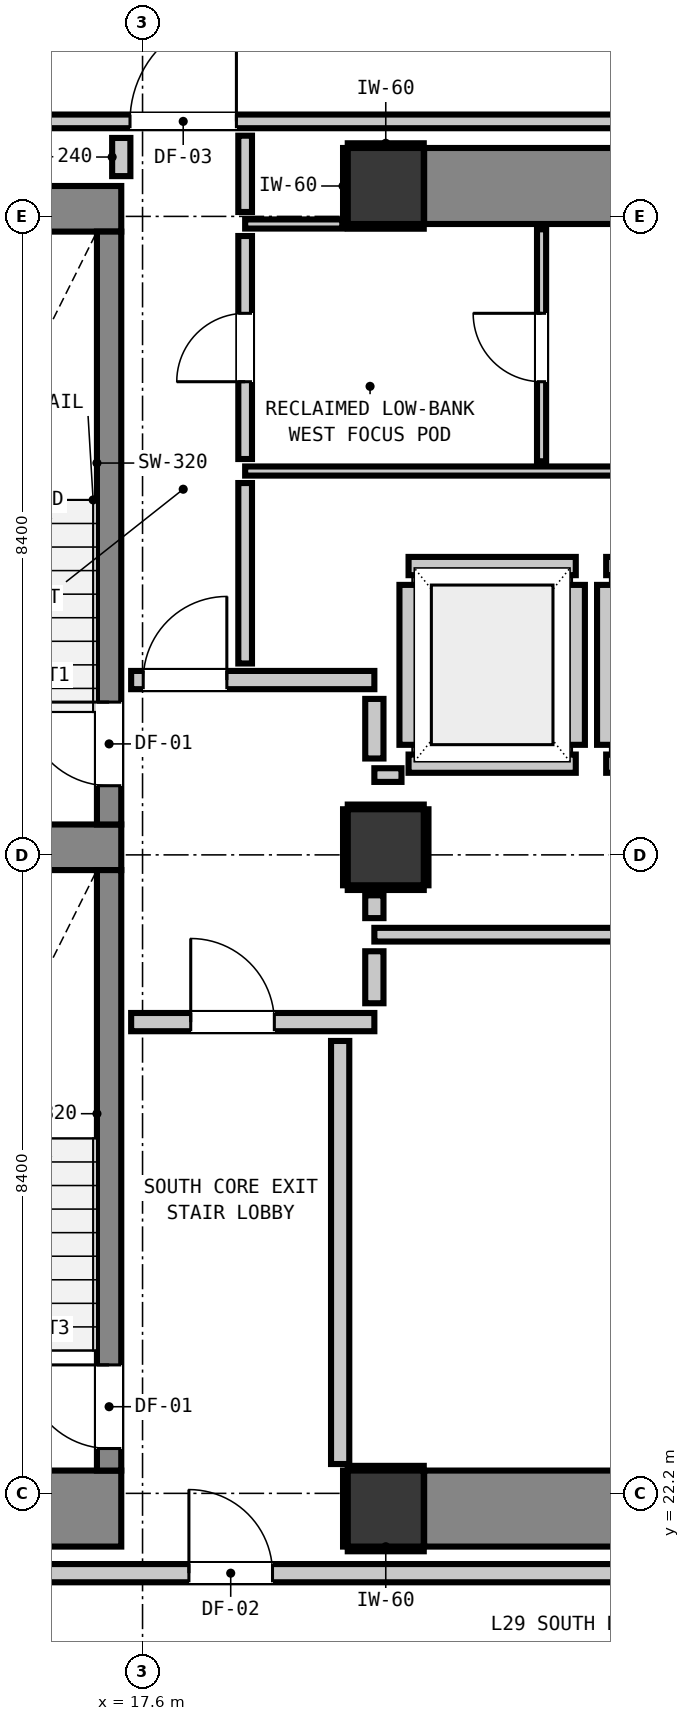
"""IFC4 building model, lengths in metres.
Left out: names, types, materials, properties, quantities, classifications, styles, units other than length and angle.
Written with IfcOpenShell. Run it as: python <this file> out.ifc"""

import sys

from ifc_helpers import new_model, si_unit, direction, frame, frame_2d, origin, origin_2d, place, context, subcontext, project, spatial, rectangle, extrude, element, fill, save


model = new_model("IFC4")
c1 = context("Model", 3, precision=1e-05, world=origin(), true_north=direction((0.0, 1.0)))
c2 = subcontext(c1, "Body", "Model", "MODEL_VIEW")
j1 = project(units=[si_unit("LENGTHUNIT", "METRE"), si_unit("PLANEANGLEUNIT", "RADIAN")], contexts=[c1])
p1 = place(None, origin())
s1 = spatial("IfcSite", under=j1, at=p1, CompositionType="ELEMENT")
p2 = place(p1, origin())
s2 = spatial("IfcBuilding", under=s1, at=p2, CompositionType="ELEMENT")
p3 = place(p2, frame((0.0, 0.0, 102.76)))
s3 = spatial("IfcBuildingStorey", under=s2, at=p3, CompositionType="ELEMENT", Elevation=102.76)
for number, where, z_axis, x_axis in (
    (1, (20.8, 22.0, 0.0), (0.0, 0.0, 1.0), (1.0, 0.0, 0.0)),
    (2, (20.8, 39.4, 0.0), (0.0, 0.0, 1.0), (1.0, 0.0, 0.0)),
):
    element("IfcColumn", number, at=place(p3, frame(where, z_axis=z_axis, x_axis=x_axis)), inside=s3, PredefinedType="COLUMN", context=c2, shape_type="SweptSolid", body=[
        extrude(rectangle(XDim=1.0, YDim=1.0, at=origin_2d()), origin(), (0.0, 0.0, 1.0), 3.32),
    ])
p4 = place(p3, frame((13.24, 22.0, 0.0), z_axis=(0.0, 0.0, 1.0), x_axis=(1.0, 0.0, 0.0)))
e3 = element("IfcWall", 3, at=p4, inside=s3, PredefinedType="SHEAR", context=c2, shape_type="SweptSolid", body=[
    extrude(rectangle(XDim=4.08, YDim=1.0, at=frame_2d((2.04, 0.0))), origin(), (0.0, 0.0, 1.0), 3.32),
])
p5 = place(p3, frame((13.24, 39.1, 0.0), z_axis=(0.0, 0.0, 1.0), x_axis=(1.0, 0.0, 0.0)))
e4 = element("IfcWall", 4, at=p5, inside=s3, PredefinedType="SHEAR", context=c2, shape_type="SweptSolid", body=[
    extrude(rectangle(XDim=4.08, YDim=0.6, at=frame_2d((2.04, 0.0))), origin(), (0.0, 0.0, 1.0), 3.32),
])
p6 = place(p3, frame((13.905, 30.7, 0.0), z_axis=(0.0, 0.0, 1.0), x_axis=(1.0, 0.0, 0.0)))
e5 = element("IfcWall", 5, at=p6, inside=s3, PredefinedType="SHEAR", context=c2, shape_type="SweptSolid", body=[
    extrude(rectangle(XDim=3.415, YDim=0.6, at=frame_2d((1.708, 0.0))), origin(), (0.0, 0.0, 1.0), 3.32),
])
for number, where, z_axis, x_axis in (
    (6, (21.305, 22.0, 0.0), (0.0, 0.0, 1.0), (1.0, 0.0, 0.0)),
    (7, (21.305, 39.4, 0.0), (0.0, 0.0, 1.0), (1.0, 0.0, 0.0)),
):
    element("IfcWall", number, at=place(p3, frame(where, z_axis=z_axis, x_axis=x_axis)), inside=s3, PredefinedType="SHEAR", context=c2, shape_type="SweptSolid", body=[
        extrude(rectangle(XDim=7.39, YDim=1.0, at=frame_2d((3.695, 0.0))), origin(), (0.0, 0.0, 1.0), 3.32),
    ])
p7 = place(p3, frame((17.16, 31.0, 0.0), z_axis=(0.0, 0.0, 1.0), x_axis=(0.0, 1.0, 0.0)))
e8 = element("IfcWall", 8, at=p7, inside=s3, PredefinedType="SHEAR", context=c2, shape_type="SweptSolid", body=[
    extrude(rectangle(XDim=7.8, YDim=0.32, at=frame_2d((3.9, 0.0))), origin(), (0.0, 0.0, 1.0), 3.32),
])
p8 = place(p7, frame((0.51, 0.0, 0.0)))
e9 = element("IfcOpeningElement", 9, at=p8, cuts=e8, PredefinedType="OPENING", context=c2, shape_type="SweptSolid", body=[
    extrude(rectangle(XDim=1.1, YDim=2.15, at=frame_2d((0.55, 1.075))), frame((0.0, 0.17, 0.0), z_axis=(0.0, -1.0, 0.0), x_axis=(1.0, 0.0, 0.0)), (0.0, 0.0, 1.0), 0.34),
])
p9 = place(p3, frame((17.16, 22.5, 0.0), z_axis=(0.0, 0.0, 1.0), x_axis=(0.0, 1.0, 0.0)))
e10 = element("IfcWall", 10, at=p9, inside=s3, PredefinedType="SHEAR", context=c2, shape_type="SweptSolid", body=[
    extrude(rectangle(XDim=7.9, YDim=0.32, at=frame_2d((3.95, 0.0))), origin(), (0.0, 0.0, 1.0), 3.32),
])
p10 = place(p9, frame((0.29, 0.0, 0.0)))
e11 = element("IfcOpeningElement", 11, at=p10, cuts=e10, PredefinedType="OPENING", context=c2, shape_type="SweptSolid", body=[
    extrude(rectangle(XDim=1.1, YDim=2.15, at=frame_2d((0.55, 1.075))), frame((0.0, 0.17, 0.0), z_axis=(0.0, -1.0, 0.0), x_axis=(1.0, 0.0, 0.0)), (0.0, 0.0, 1.0), 0.34),
])
p11 = place(p3, frame((20.8, 30.7, 0.0), z_axis=(0.0, 0.0, 1.0), x_axis=(1.0, 0.0, 0.0)))
e12 = element("IfcColumn", 12, at=p11, inside=s3, PredefinedType="COLUMN", context=c2, shape_type="SweptSolid", body=[
    extrude(rectangle(XDim=1.0, YDim=1.0, at=origin_2d()), origin(), (0.0, 0.0, 1.0), 3.32),
])
for number, where, z_axis, x_axis in (
    (13, (21.1, 31.8, 0.0), (0.0, 0.0, 1.0), (1.0, 0.0, 0.0)),
    (14, (21.1, 34.4, 0.0), (0.0, 0.0, 1.0), (1.0, 0.0, 0.0)),
):
    element("IfcWall", number, at=place(p3, frame(where, z_axis=z_axis, x_axis=x_axis)), inside=s3, PredefinedType="PARTITIONING", context=c2, shape_type="SweptSolid", body=[
        extrude(rectangle(XDim=2.2, YDim=0.24, at=frame_2d((1.1, 0.0))), origin(), (0.0, 0.0, 1.0), 2.9),
    ])
p12 = place(p3, frame((21.1, 32.048, 0.0), z_axis=(0.0, 0.0, 1.0), x_axis=(0.0, 1.0, 0.0)))
e15 = element("IfcWall", 15, at=p12, inside=s3, PredefinedType="PARTITIONING", context=c2, shape_type="SweptSolid", body=[
    extrude(rectangle(XDim=2.104, YDim=0.24, at=frame_2d((1.052, 0.0))), origin(), (0.0, 0.0, 1.0), 0.905),
])
p13 = place(p3, frame((23.3, 32.048, 0.0), z_axis=(0.0, 0.0, 1.0), x_axis=(0.0, 1.0, 0.0)))
e16 = element("IfcWall", 16, at=p13, inside=s3, PredefinedType="PARTITIONING", context=c2, shape_type="SweptSolid", body=[
    extrude(rectangle(XDim=2.104, YDim=0.24, at=frame_2d((1.052, 0.0))), origin(), (0.0, 0.0, 1.0), 2.9),
])
for number, where, z_axis, x_axis in (
    (17, (23.7, 31.8, 0.0), (0.0, 0.0, 1.0), (1.0, 0.0, 0.0)),
    (18, (23.7, 34.4, 0.0), (0.0, 0.0, 1.0), (1.0, 0.0, 0.0)),
):
    element("IfcWall", number, at=place(p3, frame(where, z_axis=z_axis, x_axis=x_axis)), inside=s3, PredefinedType="PARTITIONING", context=c2, shape_type="SweptSolid", body=[
        extrude(rectangle(XDim=2.2, YDim=0.24, at=frame_2d((1.1, 0.0))), origin(), (0.0, 0.0, 1.0), 2.9),
    ])
p14 = place(p3, frame((23.7, 32.048, 0.0), z_axis=(0.0, 0.0, 1.0), x_axis=(0.0, 1.0, 0.0)))
e19 = element("IfcWall", 19, at=p14, inside=s3, PredefinedType="PARTITIONING", context=c2, shape_type="SweptSolid", body=[
    extrude(rectangle(XDim=2.104, YDim=0.24, at=frame_2d((1.052, 0.0))), origin(), (0.0, 0.0, 1.0), 2.9),
])
p15 = place(p3, frame((1.827, 21.15, 0.0), z_axis=(0.0, 0.0, 1.0), x_axis=(1.0, 0.0, 0.0)))
e20 = element("IfcWall", 20, at=p15, inside=s3, PredefinedType="PARTITIONING", context=c2, shape_type="SweptSolid", body=[
    extrude(rectangle(XDim=42.146, YDim=0.24, at=frame_2d((21.073, 0.0))), origin(), (0.0, 0.0, 1.0), 2.9),
])
p16 = place(p15, frame((16.383, 0.0, 0.0)))
e21 = element("IfcOpeningElement", 21, at=p16, cuts=e20, PredefinedType="OPENING", context=c2, shape_type="SweptSolid", body=[
    extrude(rectangle(XDim=1.1, YDim=2.15, at=frame_2d((0.55, 1.075))), frame((0.0, 0.13, 0.0), z_axis=(0.0, -1.0, 0.0), x_axis=(1.0, 0.0, 0.0)), (0.0, 0.0, 1.0), 0.26),
])
p17 = place(p15, frame((8.623, 0.0, 0.0)))
e22 = element("IfcOpeningElement", 22, at=p17, cuts=e20, PredefinedType="OPENING", context=c2, shape_type="SweptSolid", body=[
    extrude(rectangle(XDim=1.4, YDim=2.15, at=frame_2d((0.7, 1.075))), frame((0.0, 0.13, 0.0), z_axis=(0.0, -1.0, 0.0), x_axis=(1.0, 0.0, 0.0)), (0.0, 0.0, 1.0), 0.26),
])
p18 = place(p15, frame((36.223, 0.0, 0.0)))
e23 = element("IfcOpeningElement", 23, at=p18, cuts=e20, PredefinedType="OPENING", context=c2, shape_type="SweptSolid", body=[
    extrude(rectangle(XDim=1.4, YDim=2.15, at=frame_2d((0.7, 1.075))), frame((0.0, 0.13, 0.0), z_axis=(0.0, -1.0, 0.0), x_axis=(1.0, 0.0, 0.0)), (0.0, 0.0, 1.0), 0.26),
])
p19 = place(p3, frame((17.45, 28.4, 0.0), z_axis=(0.0, 0.0, 1.0), x_axis=(1.0, 0.0, 0.0)))
e24 = element("IfcWall", 24, at=p19, inside=s3, PredefinedType="PARTITIONING", context=c2, shape_type="SweptSolid", body=[
    extrude(rectangle(XDim=3.2, YDim=0.24, at=frame_2d((1.6, 0.0))), origin(), (0.0, 0.0, 1.0), 2.9),
])
p20 = place(p19, frame((0.784, 0.0, 0.0)))
e25 = element("IfcOpeningElement", 25, at=p20, cuts=e24, PredefinedType="OPENING", context=c2, shape_type="SweptSolid", body=[
    extrude(rectangle(XDim=1.1, YDim=2.15, at=frame_2d((0.55, 1.075))), frame((0.0, 0.13, 0.0), z_axis=(0.0, -1.0, 0.0), x_axis=(1.0, 0.0, 0.0)), (0.0, 0.0, 1.0), 0.26),
])
p21 = place(p3, frame((17.45, 32.9, 0.0), z_axis=(0.0, 0.0, 1.0), x_axis=(1.0, 0.0, 0.0)))
e26 = element("IfcWall", 26, at=p21, inside=s3, PredefinedType="PARTITIONING", context=c2, shape_type="SweptSolid", body=[
    extrude(rectangle(XDim=3.2, YDim=0.24, at=frame_2d((1.6, 0.0))), origin(), (0.0, 0.0, 1.0), 2.9),
])
p22 = place(p21, frame((0.159, 0.0, 0.0)))
e27 = element("IfcOpeningElement", 27, at=p22, cuts=e26, PredefinedType="OPENING", context=c2, shape_type="SweptSolid", body=[
    extrude(rectangle(XDim=1.1, YDim=2.15, at=frame_2d((0.55, 1.075))), frame((0.0, 0.13, 0.0), z_axis=(0.0, -1.0, 0.0), x_axis=(1.0, 0.0, 0.0)), (0.0, 0.0, 1.0), 0.26),
])
p23 = place(p3, frame((20.65, 29.55, 0.0), z_axis=(0.0, 0.0, 1.0), x_axis=(1.0, 0.0, 0.0)))
e28 = element("IfcWall", 28, at=p23, inside=s3, PredefinedType="PARTITIONING", context=c2, shape_type="SweptSolid", body=[
    extrude(rectangle(XDim=9.325, YDim=0.18, at=frame_2d((4.663, 0.0))), origin(), (0.0, 0.0, 1.0), 2.9),
])
p24 = place(p3, frame((20.65, 31.65, 0.0), z_axis=(0.0, 0.0, 1.0), x_axis=(1.0, 0.0, 0.0)))
e29 = element("IfcWall", 29, at=p24, inside=s3, PredefinedType="PARTITIONING", context=c2, shape_type="SweptSolid", body=[
    extrude(rectangle(XDim=0.357, YDim=0.18, at=frame_2d((0.179, 0.0))), origin(), (0.0, 0.0, 1.0), 2.9),
])
p25 = place(p3, frame((1.827, 40.25, 0.0), z_axis=(0.0, 0.0, 1.0), x_axis=(1.0, 0.0, 0.0)))
e30 = element("IfcWall", 30, at=p25, inside=s3, PredefinedType="PARTITIONING", context=c2, shape_type="SweptSolid", body=[
    extrude(rectangle(XDim=42.146, YDim=0.18, at=frame_2d((21.073, 0.0))), origin(), (0.0, 0.0, 1.0), 2.9),
])
p26 = place(p25, frame((15.608, 0.0, 0.0)))
e31 = element("IfcOpeningElement", 31, at=p26, cuts=e30, PredefinedType="OPENING", context=c2, shape_type="SweptSolid", body=[
    extrude(rectangle(XDim=1.4, YDim=2.15, at=frame_2d((0.7, 1.075))), frame((0.0, 0.1, 0.0), z_axis=(0.0, -1.0, 0.0), x_axis=(1.0, 0.0, 0.0)), (0.0, 0.0, 1.0), 0.2),
])
p27 = place(p25, frame((8.623, 0.0, 0.0)))
e32 = element("IfcOpeningElement", 32, at=p27, cuts=e30, PredefinedType="OPENING", context=c2, shape_type="SweptSolid", body=[
    extrude(rectangle(XDim=1.4, YDim=2.15, at=frame_2d((0.7, 1.075))), frame((0.0, 0.1, 0.0), z_axis=(0.0, -1.0, 0.0), x_axis=(1.0, 0.0, 0.0)), (0.0, 0.0, 1.0), 0.2),
])
p28 = place(p25, frame((36.223, 0.0, 0.0)))
e33 = element("IfcOpeningElement", 33, at=p28, cuts=e30, PredefinedType="OPENING", context=c2, shape_type="SweptSolid", body=[
    extrude(rectangle(XDim=1.4, YDim=2.15, at=frame_2d((0.7, 1.075))), frame((0.0, 0.1, 0.0), z_axis=(0.0, -1.0, 0.0), x_axis=(1.0, 0.0, 0.0)), (0.0, 0.0, 1.0), 0.2),
])
p29 = place(p25, frame((3.697, 0.0, 0.0)))
e34 = element("IfcOpeningElement", 34, at=p29, cuts=e30, PredefinedType="OPENING", context=c2, shape_type="SweptSolid", body=[
    extrude(rectangle(XDim=0.95, YDim=2.1, at=frame_2d((0.475, 1.05))), frame((0.0, 0.1, 0.0), z_axis=(0.0, -1.0, 0.0), x_axis=(1.0, 0.0, 0.0)), (0.0, 0.0, 1.0), 0.2),
])
p30 = place(p25, frame((39.574, 0.0, 0.0)))
e35 = element("IfcOpeningElement", 35, at=p30, cuts=e30, PredefinedType="OPENING", context=c2, shape_type="SweptSolid", body=[
    extrude(rectangle(XDim=0.9, YDim=2.1, at=frame_2d((0.45, 1.05))), frame((0.0, 0.1, 0.0), z_axis=(0.0, -1.0, 0.0), x_axis=(1.0, 0.0, 0.0)), (0.0, 0.0, 1.0), 0.2),
])
p31 = place(p3, frame((18.95, 35.65, 0.0), z_axis=(0.0, 0.0, 1.0), x_axis=(1.0, 0.0, 0.0)))
e36 = element("IfcWall", 36, at=p31, inside=s3, PredefinedType="PARTITIONING", context=c2, shape_type="SweptSolid", body=[
    extrude(rectangle(XDim=11.025, YDim=0.12, at=frame_2d((5.513, 0.0))), origin(), (0.0, 0.0, 1.0), 2.9),
])
p32 = place(p3, frame((18.95, 38.9, 0.0), z_axis=(0.0, 0.0, 1.0), x_axis=(1.0, 0.0, 0.0)))
e37 = element("IfcWall", 37, at=p32, inside=s3, PredefinedType="PARTITIONING", context=c2, shape_type="SweptSolid", body=[
    extrude(rectangle(XDim=1.278, YDim=0.12, at=frame_2d((0.639, 0.0))), origin(), (0.0, 0.0, 1.0), 0.905),
])
p33 = place(p3, frame((17.32, 39.53, 0.0), z_axis=(0.0, 0.0, 1.0), x_axis=(0.0, 1.0, 0.0)))
e38 = element("IfcWall", 38, at=p33, inside=s3, PredefinedType="PARTITIONING", context=c2, shape_type="SweptSolid", body=[
    extrude(rectangle(XDim=0.502, YDim=0.24, at=frame_2d((0.251, 0.0))), origin(), (0.0, 0.0, 1.0), 2.9),
])
p34 = place(p3, frame((20.2, 22.586, 0.0), z_axis=(0.0, 0.0, 1.0), x_axis=(0.0, 1.0, 0.0)))
e39 = element("IfcWall", 39, at=p34, inside=s3, PredefinedType="PARTITIONING", context=c2, shape_type="SweptSolid", body=[
    extrude(rectangle(XDim=5.566, YDim=0.24, at=frame_2d((2.783, 0.0))), origin(), (0.0, 0.0, 1.0), 0.905),
])
p35 = place(p3, frame((20.65, 28.648, 0.0), z_axis=(0.0, 0.0, 1.0), x_axis=(0.0, 1.0, 0.0)))
e40 = element("IfcWall", 40, at=p35, inside=s3, PredefinedType="PARTITIONING", context=c2, shape_type="SweptSolid", body=[
    extrude(rectangle(XDim=0.684, YDim=0.24, at=frame_2d((0.342, 0.0))), origin(), (0.0, 0.0, 1.0), 0.905),
])
p36 = place(p3, frame((20.65, 29.768, 0.0), z_axis=(0.0, 0.0, 1.0), x_axis=(0.0, 1.0, 0.0)))
e41 = element("IfcWall", 41, at=p36, inside=s3, PredefinedType="PARTITIONING", context=c2, shape_type="SweptSolid", body=[
    extrude(rectangle(XDim=0.3, YDim=0.24, at=frame_2d((0.15, 0.0))), origin(), (0.0, 0.0, 1.0), 0.905),
])
p37 = place(p3, frame((20.65, 31.868, 0.0), z_axis=(0.0, 0.0, 1.0), x_axis=(0.0, 1.0, 0.0)))
e42 = element("IfcWall", 42, at=p37, inside=s3, PredefinedType="PARTITIONING", context=c2, shape_type="SweptSolid", body=[
    extrude(rectangle(XDim=0.784, YDim=0.24, at=frame_2d((0.392, 0.0))), origin(), (0.0, 0.0, 1.0), 0.905),
])
p38 = place(p3, frame((18.95, 33.118, 0.0), z_axis=(0.0, 0.0, 1.0), x_axis=(0.0, 1.0, 0.0)))
e43 = element("IfcWall", 43, at=p38, inside=s3, PredefinedType="PARTITIONING", context=c2, shape_type="SweptSolid", body=[
    extrude(rectangle(XDim=2.374, YDim=0.18, at=frame_2d((1.187, 0.0))), origin(), (0.0, 0.0, 1.0), 2.9),
])
p39 = place(p3, frame((18.95, 35.808, 0.0), z_axis=(0.0, 0.0, 1.0), x_axis=(0.0, 1.0, 0.0)))
e44 = element("IfcWall", 44, at=p39, inside=s3, PredefinedType="PARTITIONING", context=c2, shape_type="SweptSolid", body=[
    extrude(rectangle(XDim=2.934, YDim=0.18, at=frame_2d((1.467, 0.0))), origin(), (0.0, 0.0, 1.0), 2.9),
])
p40 = place(p39, frame((1.017, 0.0, 0.0)))
e45 = element("IfcOpeningElement", 45, at=p40, cuts=e44, PredefinedType="OPENING", context=c2, shape_type="SweptSolid", body=[
    extrude(rectangle(XDim=0.9, YDim=2.1, at=frame_2d((0.45, 1.05))), frame((0.0, 0.1, 0.0), z_axis=(0.0, -1.0, 0.0), x_axis=(1.0, 0.0, 0.0)), (0.0, 0.0, 1.0), 0.2),
])
p41 = place(p3, frame((18.95, 39.058, 0.0), z_axis=(0.0, 0.0, 1.0), x_axis=(0.0, 1.0, 0.0)))
e46 = element("IfcWall", 46, at=p41, inside=s3, PredefinedType="PARTITIONING", context=c2, shape_type="SweptSolid", body=[
    extrude(rectangle(XDim=1.004, YDim=0.18, at=frame_2d((0.502, 0.0))), origin(), (0.0, 0.0, 1.0), 2.9),
])
p42 = place(p3, frame((22.85, 35.778, 0.0), z_axis=(0.0, 0.0, 1.0), x_axis=(0.0, 1.0, 0.0)))
e47 = element("IfcWall", 47, at=p42, inside=s3, PredefinedType="PARTITIONING", context=c2, shape_type="SweptSolid", body=[
    extrude(rectangle(XDim=3.052, YDim=0.12, at=frame_2d((1.526, 0.0))), origin(), (0.0, 0.0, 1.0), 2.9),
])
p43 = place(p42, frame((1.047, 0.0, 0.0)))
e48 = element("IfcOpeningElement", 48, at=p43, cuts=e47, PredefinedType="OPENING", context=c2, shape_type="SweptSolid", body=[
    extrude(rectangle(XDim=0.9, YDim=2.1, at=frame_2d((0.45, 1.05))), frame((0.0, 0.07, 0.0), z_axis=(0.0, -1.0, 0.0), x_axis=(1.0, 0.0, 0.0)), (0.0, 0.0, 1.0), 0.14),
])
for number, where, z_axis, x_axis in (
    (49, (20.3, 21.468, 0.0), (0.0, 0.0, 1.0), (1.0, 0.0, 0.0)),
    (50, (20.3, 22.532, 0.0), (0.0, 0.0, 1.0), (1.0, 0.0, 0.0)),
    (51, (20.268, 21.5, 0.0), (0.0, 0.0, 1.0), (0.0, 1.0, 0.0)),
    (52, (20.3, 38.868, 0.0), (0.0, 0.0, 1.0), (1.0, 0.0, 0.0)),
    (53, (20.3, 39.932, 0.0), (0.0, 0.0, 1.0), (1.0, 0.0, 0.0)),
    (54, (20.268, 38.9, 0.0), (0.0, 0.0, 1.0), (0.0, 1.0, 0.0)),
    (55, (20.3, 30.168, 0.0), (0.0, 0.0, 1.0), (1.0, 0.0, 0.0)),
    (56, (20.3, 31.232, 0.0), (0.0, 0.0, 1.0), (1.0, 0.0, 0.0)),
    (57, (20.268, 30.2, 0.0), (0.0, 0.0, 1.0), (0.0, 1.0, 0.0)),
    (58, (21.332, 30.2, 0.0), (0.0, 0.0, 1.0), (0.0, 1.0, 0.0)),
):
    element("IfcWall", number, at=place(p3, frame(where, z_axis=z_axis, x_axis=x_axis)), inside=s3, PredefinedType="PARTITIONING", context=c2, shape_type="SweptSolid", body=[
        extrude(rectangle(XDim=1.0, YDim=0.06, at=frame_2d((0.5, 0.0))), origin(), (0.0, 0.0, 1.0), 0.905),
    ])
p44 = place(p8, origin())
e59 = element("IfcDoor", 59, at=p44, inside=s3, OperationType="SINGLE_SWING_RIGHT", PredefinedType="DOOR", context=c2, shape_type="SweptSolid", body=[
    extrude(rectangle(XDim=1.1, YDim=2.15, at=frame_2d((0.55, 1.075))), frame((0.0, 0.025, 0.0), z_axis=(0.0, -1.0, 0.0), x_axis=(1.0, 0.0, 0.0)), (0.0, 0.0, 1.0), 0.05),
])
fill(e9, e59)
p45 = place(p10, origin())
e60 = element("IfcDoor", 60, at=p45, inside=s3, OperationType="SINGLE_SWING_RIGHT", PredefinedType="DOOR", context=c2, shape_type="SweptSolid", body=[
    extrude(rectangle(XDim=1.1, YDim=2.15, at=frame_2d((0.55, 1.075))), frame((0.0, 0.025, 0.0), z_axis=(0.0, -1.0, 0.0), x_axis=(1.0, 0.0, 0.0)), (0.0, 0.0, 1.0), 0.05),
])
fill(e11, e60)
p46 = place(p20, origin())
e61 = element("IfcDoor", 61, at=p46, inside=s3, OperationType="SINGLE_SWING_LEFT", PredefinedType="DOOR", context=c2, shape_type="SweptSolid", body=[
    extrude(rectangle(XDim=1.1, YDim=2.15, at=frame_2d((0.55, 1.075))), frame((0.0, 0.025, 0.0), z_axis=(0.0, -1.0, 0.0), x_axis=(1.0, 0.0, 0.0)), (0.0, 0.0, 1.0), 0.05),
])
fill(e25, e61)
p47 = place(p22, origin())
e62 = element("IfcDoor", 62, at=p47, inside=s3, OperationType="SINGLE_SWING_RIGHT", PredefinedType="DOOR", context=c2, shape_type="SweptSolid", body=[
    extrude(rectangle(XDim=1.1, YDim=2.15, at=frame_2d((0.55, 1.075))), frame((0.0, 0.025, 0.0), z_axis=(0.0, -1.0, 0.0), x_axis=(1.0, 0.0, 0.0)), (0.0, 0.0, 1.0), 0.05),
])
fill(e27, e62)
p48 = place(p16, origin())
e63 = element("IfcDoor", 63, at=p48, inside=s3, OperationType="SINGLE_SWING_LEFT", PredefinedType="DOOR", context=c2, shape_type="SweptSolid", body=[
    extrude(rectangle(XDim=1.1, YDim=2.15, at=frame_2d((0.55, 1.075))), frame((0.0, 0.025, 0.0), z_axis=(0.0, -1.0, 0.0), x_axis=(1.0, 0.0, 0.0)), (0.0, 0.0, 1.0), 0.05),
])
fill(e21, e63)
p49 = place(p26, origin())
e64 = element("IfcDoor", 64, at=p49, inside=s3, OperationType="SINGLE_SWING_RIGHT", PredefinedType="DOOR", context=c2, shape_type="SweptSolid", body=[
    extrude(rectangle(XDim=1.4, YDim=2.15, at=frame_2d((0.7, 1.075))), frame((0.0, 0.025, 0.0), z_axis=(0.0, -1.0, 0.0), x_axis=(1.0, 0.0, 0.0)), (0.0, 0.0, 1.0), 0.05),
])
fill(e31, e64)
p50 = place(p40, origin())
e65 = element("IfcDoor", 65, at=p50, inside=s3, OperationType="SINGLE_SWING_LEFT", PredefinedType="DOOR", context=c2, shape_type="SweptSolid", body=[
    extrude(rectangle(XDim=0.9, YDim=2.1, at=frame_2d((0.45, 1.05))), frame((0.0, 0.025, 0.0), z_axis=(0.0, -1.0, 0.0), x_axis=(1.0, 0.0, 0.0)), (0.0, 0.0, 1.0), 0.05),
])
fill(e45, e65)
p51 = place(p43, origin())
e66 = element("IfcDoor", 66, at=p51, inside=s3, OperationType="SINGLE_SWING_RIGHT", PredefinedType="DOOR", context=c2, shape_type="SweptSolid", body=[
    extrude(rectangle(XDim=0.9, YDim=2.1, at=frame_2d((0.45, 1.05))), frame((0.0, 0.025, 0.0), z_axis=(0.0, -1.0, 0.0), x_axis=(1.0, 0.0, 0.0)), (0.0, 0.0, 1.0), 0.05),
])
fill(e48, e66)
save(model, sys.argv[1])
